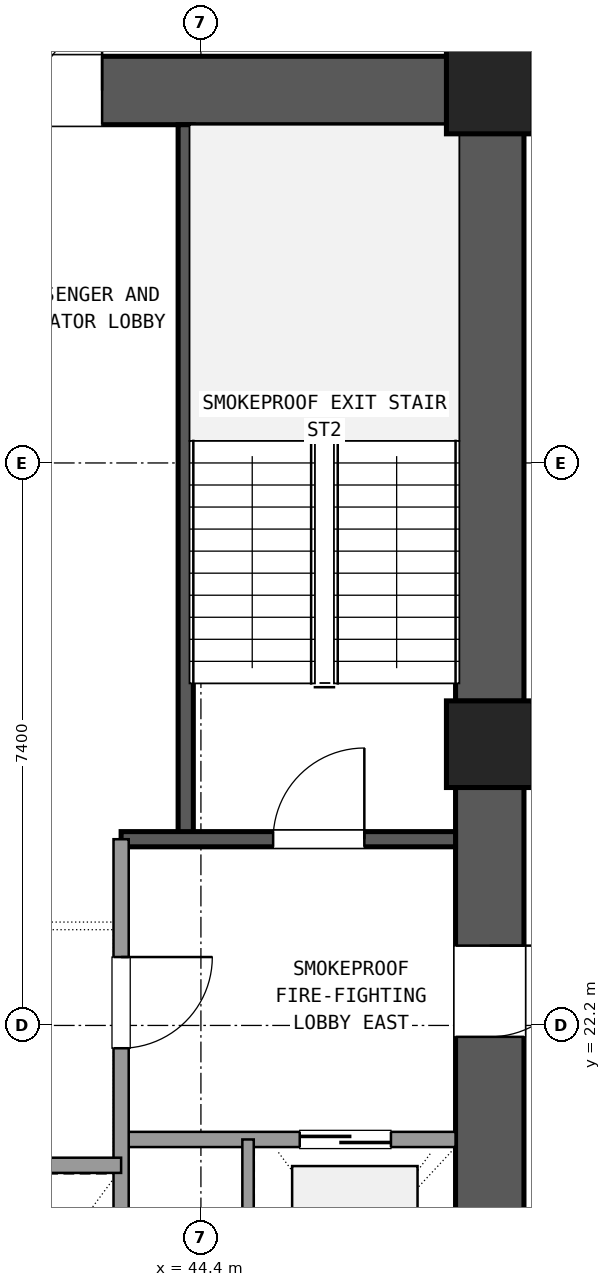
"""IFC4 building model, lengths in metres.
Left out: names, types, materials, properties, quantities, classifications, styles, units other than length and angle.
Written with IfcOpenShell. Run it as: python <this file> out.ifc"""

import sys

from ifc_helpers import new_model, si_unit, direction, frame, frame_2d, origin, origin_2d, place, context, subcontext, project, spatial, rectangle, extrude, element, fill, save


model = new_model("IFC4")
c1 = context("Model", 3, precision=1e-05, world=origin(), true_north=direction((0.0, 1.0)))
c2 = subcontext(c1, "Body", "Model", "MODEL_VIEW")
j1 = project(units=[si_unit("LENGTHUNIT", "METRE"), si_unit("PLANEANGLEUNIT", "RADIAN")], contexts=[c1])
p1 = place(None, origin())
s1 = spatial("IfcSite", under=j1, at=p1, CompositionType="ELEMENT")
p2 = place(p1, origin())
s2 = spatial("IfcBuilding", under=s1, at=p2, CompositionType="ELEMENT")
p3 = place(p2, frame((0.0, 0.0, 5.4)))
s3 = spatial("IfcBuildingStorey", under=s2, at=p3, CompositionType="ELEMENT", Elevation=5.4)
for number, where, z_axis, x_axis in (
    (1, (48.2, 25.9, 0.0), (0.0, 0.0, 1.0), (1.0, 0.0, 0.0)),
    (2, (48.2, 34.5, 0.0), (0.0, 0.0, 1.0), (1.0, 0.0, 0.0)),
):
    element("IfcColumn", number, at=place(p3, frame(where, z_axis=z_axis, x_axis=x_axis)), inside=s3, PredefinedType="COLUMN", context=c2, shape_type="SweptSolid", body=[
        extrude(rectangle(XDim=1.14, YDim=1.14, at=origin_2d()), origin(), (0.0, 0.0, 1.0), 4.5),
    ])
p4 = place(p3, frame((48.2, 17.865, 0.0), z_axis=(0.0, 0.0, 1.0), x_axis=(0.0, 1.0, 0.0)))
e3 = element("IfcWall", 3, at=p4, inside=s3, PredefinedType="SHEAR", context=c2, shape_type="SweptSolid", body=[
    extrude(rectangle(XDim=7.47, YDim=0.9, at=frame_2d((3.735, 0.0))), origin(), (0.0, 0.0, 1.0), 4.2),
])
p5 = place(p4, frame((4.185, 0.0, 0.0)))
e4 = element("IfcOpeningElement", 4, at=p5, cuts=e3, PredefinedType="OPENING", context=c2, shape_type="SweptSolid", body=[
    extrude(rectangle(XDim=1.2, YDim=2.15, at=frame_2d((0.6, 1.075))), frame((0.0, 0.46, 0.0), z_axis=(0.0, -1.0, 0.0), x_axis=(1.0, 0.0, 0.0)), (0.0, 0.0, 1.0), 0.92),
])
p6 = place(p3, frame((48.2, 26.465, 0.0), z_axis=(0.0, 0.0, 1.0), x_axis=(0.0, 1.0, 0.0)))
e5 = element("IfcWall", 5, at=p6, inside=s3, PredefinedType="SHEAR", context=c2, shape_type="SweptSolid", body=[
    extrude(rectangle(XDim=7.47, YDim=0.9, at=frame_2d((3.735, 0.0))), origin(), (0.0, 0.0, 1.0), 4.2),
])
p7 = place(p3, frame((47.635, 34.5, 0.0), z_axis=(0.0, 0.0, 1.0), x_axis=(-1.0, 0.0, 0.0)))
e6 = element("IfcWall", 6, at=p7, inside=s3, PredefinedType="SHEAR", context=c2, shape_type="SweptSolid", body=[
    extrude(rectangle(XDim=10.07, YDim=0.9, at=frame_2d((5.035, 0.0))), origin(), (0.0, 0.0, 1.0), 4.2),
])
p8 = place(p7, frame((4.535, 0.0, 0.0)))
e7 = element("IfcOpeningElement", 7, at=p8, cuts=e6, PredefinedType="OPENING", context=c2, shape_type="SweptSolid", body=[
    extrude(rectangle(XDim=1.6, YDim=2.2, at=frame_2d((0.8, 1.1))), frame((0.0, 0.46, 0.0), z_axis=(0.0, -1.0, 0.0), x_axis=(1.0, 0.0, 0.0)), (0.0, 0.0, 1.0), 0.92),
])
p9 = place(p3, frame((44.2, 24.65, 0.0), z_axis=(0.0, 0.0, 1.0), x_axis=(0.0, 1.0, 0.0)))
e8 = element("IfcWall", 8, at=p9, inside=s3, PredefinedType="SHEAR", context=c2, shape_type="SweptSolid", body=[
    extrude(rectangle(XDim=9.4, YDim=0.2, at=frame_2d((4.7, 0.0))), origin(), (0.0, 0.0, 1.0), 4.2),
])
p10 = place(p3, frame((43.35, 24.65, 0.0), z_axis=(0.0, 0.0, 1.0), x_axis=(1.0, 0.0, 0.0)))
e9 = element("IfcWall", 9, at=p10, inside=s3, PredefinedType="SHEAR", context=c2, shape_type="SweptSolid", body=[
    extrude(rectangle(XDim=4.4, YDim=0.2, at=frame_2d((2.2, 0.0))), origin(), (0.0, 0.0, 1.0), 4.2),
])
p11 = place(p10, frame((2.0, 0.0, 0.0)))
e10 = element("IfcOpeningElement", 10, at=p11, cuts=e9, PredefinedType="OPENING", context=c2, shape_type="SweptSolid", body=[
    extrude(rectangle(XDim=1.2, YDim=2.15, at=frame_2d((0.6, 1.075))), frame((0.0, 0.11, 0.0), z_axis=(0.0, -1.0, 0.0), x_axis=(1.0, 0.0, 0.0)), (0.0, 0.0, 1.0), 0.22),
])
p12 = place(p3, frame((43.35, 20.7, 0.0), z_axis=(0.0, 0.0, 1.0), x_axis=(1.0, 0.0, 0.0)))
e11 = element("IfcWall", 11, at=p12, inside=s3, PredefinedType="SOLIDWALL", context=c2, shape_type="SweptSolid", body=[
    extrude(rectangle(XDim=4.4, YDim=0.2, at=frame_2d((2.2, 0.0))), origin(), (0.0, 0.0, 1.0), 3.21),
])
p13 = place(p12, frame((2.35, 0.0, 0.0)))
e12 = element("IfcOpeningElement", 12, at=p13, cuts=e11, PredefinedType="OPENING", context=c2, shape_type="SweptSolid", body=[
    extrude(rectangle(XDim=1.2, YDim=2.15, at=frame_2d((0.6, 1.075))), frame((0.0, 0.11, 0.0), z_axis=(0.0, -1.0, 0.0), x_axis=(1.0, 0.0, 0.0)), (0.0, 0.0, 1.0), 0.22),
])
p14 = place(p3, frame((43.35, 17.75, 0.0), z_axis=(0.0, 0.0, 1.0), x_axis=(0.0, 1.0, 0.0)))
e13 = element("IfcWall", 13, at=p14, inside=s3, PredefinedType="SOLIDWALL", context=c2, shape_type="SweptSolid", body=[
    extrude(rectangle(XDim=6.9, YDim=0.2, at=frame_2d((3.45, 0.0))), origin(), (0.0, 0.0, 1.0), 3.21),
])
p15 = place(p14, frame((4.15, 0.0, 0.0)))
e14 = element("IfcOpeningElement", 14, at=p15, cuts=e13, PredefinedType="OPENING", context=c2, shape_type="SweptSolid", body=[
    extrude(rectangle(XDim=1.2, YDim=2.15, at=frame_2d((0.6, 1.075))), frame((0.0, 0.11, 0.0), z_axis=(0.0, -1.0, 0.0), x_axis=(1.0, 0.0, 0.0)), (0.0, 0.0, 1.0), 0.22),
])
p16 = place(p3, frame((45.02, 17.75, 0.0), z_axis=(0.0, 0.0, 1.0), x_axis=(0.0, 1.0, 0.0)))
e15 = element("IfcWall", 15, at=p16, inside=s3, PredefinedType="PARTITIONING", context=c2, shape_type="SweptSolid", body=[
    extrude(rectangle(XDim=2.95, YDim=0.15, at=frame_2d((1.475, 0.0))), origin(), (0.0, 0.0, 1.0), 3.21),
])
p17 = place(p3, frame((37.25, 20.36, 0.0), z_axis=(0.0, 0.0, 1.0), x_axis=(1.0, 0.0, 0.0)))
e16 = element("IfcWall", 16, at=p17, inside=s3, PredefinedType="SOLIDWALL", context=c2, shape_type="SweptSolid", body=[
    extrude(rectangle(XDim=6.1, YDim=0.2, at=frame_2d((3.05, 0.0))), origin(), (0.0, 0.0, 1.0), 3.21),
])
p18 = place(p11, origin())
e17 = element("IfcDoor", 17, at=p18, inside=s3, OperationType="SINGLE_SWING_RIGHT", PredefinedType="DOOR", context=c2, shape_type="SweptSolid", body=[
    extrude(rectangle(XDim=1.2, YDim=2.15, at=frame_2d((0.6, 1.075))), frame((0.0, 0.025, 0.0), z_axis=(0.0, -1.0, 0.0), x_axis=(1.0, 0.0, 0.0)), (0.0, 0.0, 1.0), 0.05),
])
fill(e10, e17)
p19 = place(p13, origin())
e18 = element("IfcDoor", 18, at=p19, inside=s3, OperationType="SLIDING_TO_RIGHT", PredefinedType="DOOR", context=c2, shape_type="SweptSolid", body=[
    extrude(rectangle(XDim=1.2, YDim=2.15, at=frame_2d((0.6, 1.075))), frame((0.0, 0.025, 0.0), z_axis=(0.0, -1.0, 0.0), x_axis=(1.0, 0.0, 0.0)), (0.0, 0.0, 1.0), 0.05),
])
fill(e12, e18)
p20 = place(p15, frame((1.2, 0.0, 0.0), z_axis=(0.0, 0.0, 1.0), x_axis=(-1.0, 0.0, 0.0)))
e19 = element("IfcDoor", 19, at=p20, inside=s3, OperationType="SINGLE_SWING_RIGHT", PredefinedType="DOOR", context=c2, shape_type="SweptSolid", body=[
    extrude(rectangle(XDim=1.2, YDim=2.15, at=frame_2d((0.6, 1.075))), frame((0.0, 0.025, 0.0), z_axis=(0.0, -1.0, 0.0), x_axis=(1.0, 0.0, 0.0)), (0.0, 0.0, 1.0), 0.05),
])
fill(e14, e19)
p21 = place(p5, frame((1.2, 0.0, 0.0), z_axis=(0.0, 0.0, 1.0), x_axis=(-1.0, 0.0, 0.0)))
e20 = element("IfcDoor", 20, at=p21, inside=s3, OperationType="SINGLE_SWING_RIGHT", PredefinedType="DOOR", context=c2, shape_type="SweptSolid", body=[
    extrude(rectangle(XDim=1.2, YDim=2.15, at=frame_2d((0.6, 1.075))), frame((0.0, 0.025, 0.0), z_axis=(0.0, -1.0, 0.0), x_axis=(1.0, 0.0, 0.0)), (0.0, 0.0, 1.0), 0.05),
])
fill(e4, e20)
p22 = place(p8, frame((1.6, 0.0, 0.0), z_axis=(0.0, 0.0, 1.0), x_axis=(-1.0, 0.0, 0.0)))
e21 = element("IfcDoor", 21, at=p22, inside=s3, OperationType="DOUBLE_DOOR_SINGLE_SWING", PredefinedType="DOOR", context=c2, shape_type="SweptSolid", body=[
    extrude(rectangle(XDim=1.6, YDim=2.2, at=frame_2d((0.8, 1.1))), frame((0.0, 0.025, 0.0), z_axis=(0.0, -1.0, 0.0), x_axis=(1.0, 0.0, 0.0)), (0.0, 0.0, 1.0), 0.05),
])
fill(e7, e21)
save(model, sys.argv[1])
